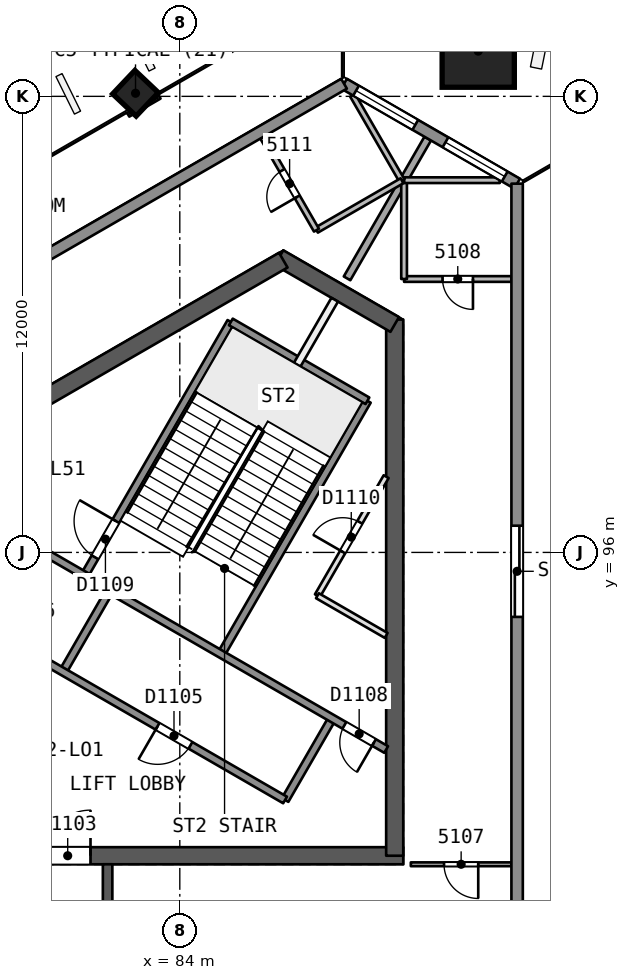
"""IFC4 building model, lengths in metres.
Left out: names, types, materials, properties, quantities, classifications, styles, units other than length and angle.
Written with IfcOpenShell. Run it as: python <this file> out.ifc"""

import sys

from ifc_helpers import new_model, si_unit, direction, frame, frame_2d, origin, origin_2d, place, context, subcontext, project, spatial, rectangle, extrude, element, fill, save


model = new_model("IFC4")
c1 = context("Model", 3, precision=1e-05, world=origin(), true_north=direction((0.0, 1.0)))
c2 = subcontext(c1, "Body", "Model", "MODEL_VIEW")
j1 = project(units=[si_unit("LENGTHUNIT", "METRE"), si_unit("PLANEANGLEUNIT", "RADIAN")], contexts=[c1])
p1 = place(None, origin())
s1 = spatial("IfcSite", under=j1, at=p1, CompositionType="ELEMENT")
p2 = place(p1, origin())
s2 = spatial("IfcBuilding", under=s1, at=p2, CompositionType="ELEMENT")
p3 = place(p2, frame((0.0, 0.0, 209.5)))
s3 = spatial("IfcBuildingStorey", under=s2, at=p3, CompositionType="ELEMENT", Elevation=209.5)
p4 = place(p3, frame((79.63, 88.019, 0.0), z_axis=(0.0, 0.0, 1.0), x_axis=(1.0, 0.0, 0.0)))
e1 = element("IfcWall", 1, at=p4, inside=s3, PredefinedType="SHEAR", context=c2, shape_type="SweptSolid", body=[
    extrude(rectangle(XDim=10.25, YDim=0.45, at=frame_2d((5.125, 0.0))), origin(), (0.0, 0.0, 1.0), 3.7),
])
p5 = place(p4, frame((0.82, 0.0, 0.0)))
e2 = element("IfcOpeningElement", 2, at=p5, cuts=e1, PredefinedType="OPENING", context=c2, shape_type="SweptSolid", body=[
    extrude(rectangle(XDim=1.2, YDim=2.1, at=frame_2d((0.6, 1.05))), frame((0.0, 0.235, 0.0), z_axis=(0.0, -1.0, 0.0), x_axis=(1.0, 0.0, 0.0)), (0.0, 0.0, 1.0), 0.471),
])
p6 = place(p3, frame((89.655, 88.019, 0.0), z_axis=(0.0, 0.0, 1.0), x_axis=(0.0, 1.0, 0.0)))
e3 = element("IfcWall", 3, at=p6, inside=s3, PredefinedType="SHEAR", context=c2, shape_type="SweptSolid", body=[
    extrude(rectangle(XDim=14.108, YDim=0.45, at=frame_2d((7.054, 0.0))), origin(), (0.0, 0.0, 1.0), 3.7),
])
p7 = place(p3, frame((89.655, 101.998, 0.0), z_axis=(0.0, 0.0, 1.0), x_axis=(-0.866042179588, 0.49997094233, 0.0)))
e4 = element("IfcWall", 4, at=p7, inside=s3, PredefinedType="SHEAR", context=c2, shape_type="SweptSolid", body=[
    extrude(rectangle(XDim=3.515, YDim=0.45, at=frame_2d((1.758, 0.0))), origin(), (0.0, 0.0, 1.0), 3.7),
])
p8 = place(p3, frame((86.723, 103.69, 0.0), z_axis=(0.0, 0.0, 1.0), x_axis=(-0.866022713978, -0.500004658852, 0.0)))
e5 = element("IfcWall", 5, at=p8, inside=s3, PredefinedType="SHEAR", context=c2, shape_type="SweptSolid", body=[
    extrude(rectangle(XDim=14.203, YDim=0.45, at=frame_2d((7.102, 0.0))), origin(), (0.0, 0.0, 1.0), 3.7),
])
p9 = place(p3, frame((82.1, 72.206, 0.0), z_axis=(0.0, 0.0, 1.0), x_axis=(0.0, 1.0, 0.0)))
e6 = element("IfcWall", 6, at=p9, inside=s3, PredefinedType="SHEAR", context=c2, shape_type="SweptSolid", body=[
    extrude(rectangle(XDim=15.588, YDim=0.25, at=frame_2d((7.794, 0.0))), origin(), (0.0, 0.0, 1.0), 3.3),
])
p10 = place(p9, frame((2.618, 0.0, 0.0)))
e7 = element("IfcOpeningElement", 7, at=p10, cuts=e6, PredefinedType="OPENING", context=c2, shape_type="SweptSolid", body=[
    extrude(rectangle(XDim=1.0, YDim=2.1, at=frame_2d((0.5, 1.05))), frame((0.0, 0.135, 0.0), z_axis=(0.0, -1.0, 0.0), x_axis=(1.0, 0.0, 0.0)), (0.0, 0.0, 1.0), 0.271),
])
p11 = place(p9, frame((8.627, 0.0, 0.0)))
e8 = element("IfcOpeningElement", 8, at=p11, cuts=e6, PredefinedType="OPENING", context=c2, shape_type="SweptSolid", body=[
    extrude(rectangle(XDim=1.1, YDim=2.1, at=frame_2d((0.55, 1.05))), frame((0.0, 0.135, 0.0), z_axis=(0.0, -1.0, 0.0), x_axis=(1.0, 0.0, 0.0)), (0.0, 0.0, 1.0), 0.271),
])
p12 = place(p9, frame((12.282, 0.0, 0.0)))
e9 = element("IfcOpeningElement", 9, at=p12, cuts=e6, PredefinedType="OPENING", context=c2, shape_type="SweptSolid", body=[
    extrude(rectangle(XDim=1.0, YDim=2.1, at=frame_2d((0.5, 1.05))), frame((0.0, 0.135, 0.0), z_axis=(0.0, -1.0, 0.0), x_axis=(1.0, 0.0, 0.0)), (0.0, 0.0, 1.0), 0.271),
])
p13 = place(p3, frame((91.874, 109.226, 0.0), z_axis=(-0.017607037296, -0.030466109479, 0.999380712447), x_axis=(0.86581098392, -0.500371202332, 2.457e-09)))
e10 = element("IfcColumn", 10, at=p13, inside=s3, PredefinedType="COLUMN", context=c2, shape_type="SweptSolid", body=[
    extrude(rectangle(XDim=1.9, YDim=1.9, at=origin_2d()), origin(), (0.0, 0.0, 1.0), 3.702),
])
p14 = place(p3, frame((82.845, 108.115, 0.0), z_axis=(-0.008376454378, -0.028163354484, 0.999568237028), x_axis=(0.86585218107, 0.499844611273, 0.021339285781)))
e11 = element("IfcColumn", 11, at=p14, inside=s3, PredefinedType="COLUMN", context=c2, shape_type="SweptSolid", body=[
    extrude(rectangle(XDim=0.85, YDim=0.85, at=origin_2d()), origin(), (0.0, 0.0, 1.0), 3.702),
])
p15 = place(p3, frame((92.727, 87.794, 0.0), z_axis=(0.0, 0.0, 1.0), x_axis=(-1.0, 0.0, 0.0)))
e12 = element("IfcWall", 12, at=p15, inside=s3, PredefinedType="PARTITIONING", context=c2, shape_type="SweptSolid", body=[
    extrude(rectangle(XDim=2.648, YDim=0.1, at=frame_2d((1.324, 0.0))), origin(), (0.0, 0.0, 1.0), 3.3),
])
p16 = place(p15, frame((0.874, 0.0, 0.0)))
e13 = element("IfcOpeningElement", 13, at=p16, cuts=e12, PredefinedType="OPENING", context=c2, shape_type="SweptSolid", body=[
    extrude(rectangle(XDim=0.9, YDim=2.1, at=frame_2d((0.45, 1.05))), frame((0.0, 0.061, 0.0), z_axis=(0.0, -1.0, 0.0), x_axis=(1.0, 0.0, 0.0)), (0.0, 0.0, 1.0), 0.121),
])
p17 = place(p3, frame((92.727, 103.194, 0.0), z_axis=(0.0, 0.0, 1.0), x_axis=(-1.0, 0.0, 0.0)))
e14 = element("IfcWall", 14, at=p17, inside=s3, PredefinedType="PARTITIONING", context=c2, shape_type="SweptSolid", body=[
    extrude(rectangle(XDim=2.825, YDim=0.15, at=frame_2d((1.413, 0.0))), origin(), (0.0, 0.0, 1.0), 3.3),
])
p18 = place(p17, frame((1.013, 0.0, 0.0)))
e15 = element("IfcOpeningElement", 15, at=p18, cuts=e14, PredefinedType="OPENING", context=c2, shape_type="SweptSolid", body=[
    extrude(rectangle(XDim=0.8, YDim=2.1, at=frame_2d((0.4, 1.05))), frame((0.0, 0.085, 0.0), z_axis=(0.0, -1.0, 0.0), x_axis=(1.0, 0.0, 0.0)), (0.0, 0.0, 1.0), 0.171),
])
p19 = place(p3, frame((89.902, 103.194, 0.0), z_axis=(0.0, 0.0, 1.0), x_axis=(0.0, 1.0, 0.0)))
e16 = element("IfcWall", 16, at=p19, inside=s3, PredefinedType="PARTITIONING", context=c2, shape_type="SweptSolid", body=[
    extrude(rectangle(XDim=2.6, YDim=0.15, at=frame_2d((1.3, 0.0))), origin(), (0.0, 0.0, 1.0), 3.3),
])
p20 = place(p3, frame((89.902, 105.794, 0.0), z_axis=(0.0, 0.0, 1.0), x_axis=(1.0, 0.0, 0.0)))
e17 = element("IfcWall", 17, at=p20, inside=s3, PredefinedType="PARTITIONING", context=c2, shape_type="SweptSolid", body=[
    extrude(rectangle(XDim=2.519, YDim=0.15, at=frame_2d((1.259, 0.0))), origin(), (0.0, 0.0, 1.0), 3.3),
])
p21 = place(p3, frame((90.524, 106.889, 0.0), z_axis=(0.0, 0.0, 1.0), x_axis=(-0.499991184371, -0.86603049343, 0.0)))
e18 = element("IfcWall", 18, at=p21, inside=s3, PredefinedType="PARTITIONING", context=c2, shape_type="SweptSolid", body=[
    extrude(rectangle(XDim=4.247, YDim=0.2, at=frame_2d((2.123, 0.0))), origin(), (0.0, 0.0, 1.0), 3.3),
])
p22 = place(p3, frame((88.548, 108.03, 0.0), z_axis=(0.0, 0.0, 1.0), x_axis=(0.500058503878, -0.86599162392, 0.0)))
e19 = element("IfcWall", 19, at=p22, inside=s3, PredefinedType="PARTITIONING", context=c2, shape_type="SweptSolid", body=[
    extrude(rectangle(XDim=2.599, YDim=0.15, at=frame_2d((1.3, 0.0))), origin(), (0.0, 0.0, 1.0), 3.3),
])
p23 = place(p3, frame((89.848, 105.779, 0.0), z_axis=(0.0, 0.0, 1.0), x_axis=(-0.866021400173, -0.500006934395, 0.0)))
e20 = element("IfcWall", 20, at=p23, inside=s3, PredefinedType="PARTITIONING", context=c2, shape_type="SweptSolid", body=[
    extrude(rectangle(XDim=2.6, YDim=0.15, at=frame_2d((1.3, 0.0))), origin(), (0.0, 0.0, 1.0), 3.3),
])
p24 = place(p3, frame((87.596, 104.479, 0.0), z_axis=(0.0, 0.0, 1.0), x_axis=(-0.500014143148, 0.86601723808, 0.0)))
e21 = element("IfcWall", 21, at=p24, inside=s3, PredefinedType="PARTITIONING", context=c2, shape_type="SweptSolid", body=[
    extrude(rectangle(XDim=2.826, YDim=0.15, at=frame_2d((1.413, 0.0))), origin(), (0.0, 0.0, 1.0), 3.3),
])
p25 = place(p24, frame((1.013, 0.0, 0.0)))
e22 = element("IfcOpeningElement", 22, at=p25, cuts=e21, PredefinedType="OPENING", context=c2, shape_type="SweptSolid", body=[
    extrude(rectangle(XDim=0.8, YDim=2.1, at=frame_2d((0.4, 1.05))), frame((0.0, 0.085, 0.0), z_axis=(0.0, -1.0, 0.0), x_axis=(1.0, 0.0, 0.0)), (0.0, 0.0, 1.0), 0.171),
])
p26 = place(p3, frame((88.322, 108.333, 0.0), z_axis=(0.0, 0.0, 1.0), x_axis=(0.866014735099, -0.50001847825, 0.0)))
e23 = element("IfcWall", 23, at=p26, inside=s3, PredefinedType="SOLIDWALL", context=c2, shape_type="SweptSolid", body=[
    extrude(rectangle(XDim=5.259, YDim=0.3, at=frame_2d((2.629, 0.0))), origin(), (0.0, 0.0, 1.0), 3.3),
])
p27 = place(p26, frame((3.082, 0.0, 0.9)))
e24 = element("IfcOpeningElement", 24, at=p27, cuts=e23, PredefinedType="OPENING", context=c2, shape_type="SweptSolid", body=[
    extrude(rectangle(XDim=1.8, YDim=1.5, at=frame_2d((0.9, 0.75))), frame((0.0, 0.161, 0.0), z_axis=(0.0, -1.0, 0.0), x_axis=(1.0, 0.0, 0.0)), (0.0, 0.0, 1.0), 0.321),
])
p28 = place(p26, frame((0.365, 0.0, 0.9)))
e25 = element("IfcOpeningElement", 25, at=p28, cuts=e23, PredefinedType="OPENING", context=c2, shape_type="SweptSolid", body=[
    extrude(rectangle(XDim=1.8, YDim=1.5, at=frame_2d((0.9, 0.75))), frame((0.0, 0.161, 0.0), z_axis=(0.0, -1.0, 0.0), x_axis=(1.0, 0.0, 0.0)), (0.0, 0.0, 1.0), 0.321),
])
p29 = place(p3, frame((92.876, 105.703, 0.0), z_axis=(0.0, 0.0, 1.0), x_axis=(0.0, -1.0, 0.0)))
e26 = element("IfcWall", 26, at=p29, inside=s3, PredefinedType="SOLIDWALL", context=c2, shape_type="SweptSolid", body=[
    extrude(rectangle(XDim=51.406, YDim=0.3, at=frame_2d((25.703, 0.0))), origin(), (0.0, 0.0, 1.0), 3.3),
])
p30 = place(p29, frame((24.191, 0.0, 0.0)))
e27 = element("IfcOpeningElement", 27, at=p30, cuts=e26, PredefinedType="OPENING", context=c2, shape_type="SweptSolid", body=[
    extrude(rectangle(XDim=2.4, YDim=2.4, at=frame_2d((1.2, 1.2))), frame((0.0, 0.161, 0.0), z_axis=(0.0, -1.0, 0.0), x_axis=(1.0, 0.0, 0.0)), (0.0, 0.0, 1.0), 0.321),
])
p31 = place(p29, frame((29.18, 0.0, 0.0)))
e28 = element("IfcOpeningElement", 28, at=p31, cuts=e26, PredefinedType="OPENING", context=c2, shape_type="SweptSolid", body=[
    extrude(rectangle(XDim=2.4, YDim=2.4, at=frame_2d((1.2, 1.2))), frame((0.0, 0.161, 0.0), z_axis=(0.0, -1.0, 0.0), x_axis=(1.0, 0.0, 0.0)), (0.0, 0.0, 1.0), 0.321),
])
p32 = place(p29, frame((39.983, 0.0, 0.0)))
e29 = element("IfcOpeningElement", 29, at=p32, cuts=e26, PredefinedType="OPENING", context=c2, shape_type="SweptSolid", body=[
    extrude(rectangle(XDim=2.4, YDim=2.4, at=frame_2d((1.2, 1.2))), frame((0.0, 0.161, 0.0), z_axis=(0.0, -1.0, 0.0), x_axis=(1.0, 0.0, 0.0)), (0.0, 0.0, 1.0), 0.321),
])
p33 = place(p29, frame((19.515, 0.0, 0.0)))
e30 = element("IfcOpeningElement", 30, at=p33, cuts=e26, PredefinedType="OPENING", context=c2, shape_type="SweptSolid", body=[
    extrude(rectangle(XDim=2.4, YDim=2.4, at=frame_2d((1.2, 1.2))), frame((0.0, 0.161, 0.0), z_axis=(0.0, -1.0, 0.0), x_axis=(1.0, 0.0, 0.0)), (0.0, 0.0, 1.0), 0.321),
])
p34 = place(p29, frame((9.0, 0.0, 0.0)))
e31 = element("IfcOpeningElement", 31, at=p34, cuts=e26, PredefinedType="OPENING", context=c2, shape_type="SweptSolid", body=[
    extrude(rectangle(XDim=2.4, YDim=2.4, at=frame_2d((1.2, 1.2))), frame((0.0, 0.161, 0.0), z_axis=(0.0, -1.0, 0.0), x_axis=(1.0, 0.0, 0.0)), (0.0, 0.0, 1.0), 0.321),
])
p35 = place(p3, frame((43.802, 82.63, 0.0), z_axis=(0.0, 0.0, 1.0), x_axis=(0.866026224187, 0.499998579018, 0.0)))
e32 = element("IfcWall", 32, at=p35, inside=s3, PredefinedType="SOLIDWALL", context=c2, shape_type="SweptSolid", body=[
    extrude(rectangle(XDim=51.406, YDim=0.3, at=frame_2d((25.703, 0.0))), origin(), (0.0, 0.0, 1.0), 3.3),
])
p36 = place(p35, frame((24.503, 0.0, 0.0)))
e33 = element("IfcOpeningElement", 33, at=p36, cuts=e32, PredefinedType="OPENING", context=c2, shape_type="SweptSolid", body=[
    extrude(rectangle(XDim=2.4, YDim=2.4, at=frame_2d((1.2, 1.2))), frame((0.0, 0.161, 0.0), z_axis=(0.0, -1.0, 0.0), x_axis=(1.0, 0.0, 0.0)), (0.0, 0.0, 1.0), 0.321),
])
p37 = place(p35, frame((30.271, 0.0, 0.0)))
e34 = element("IfcOpeningElement", 34, at=p37, cuts=e32, PredefinedType="OPENING", context=c2, shape_type="SweptSolid", body=[
    extrude(rectangle(XDim=2.4, YDim=2.4, at=frame_2d((1.2, 1.2))), frame((0.0, 0.161, 0.0), z_axis=(0.0, -1.0, 0.0), x_axis=(1.0, 0.0, 0.0)), (0.0, 0.0, 1.0), 0.321),
])
p38 = place(p35, frame((39.983, 0.0, 0.0)))
e35 = element("IfcOpeningElement", 35, at=p38, cuts=e32, PredefinedType="OPENING", context=c2, shape_type="SweptSolid", body=[
    extrude(rectangle(XDim=2.4, YDim=2.4, at=frame_2d((1.2, 1.2))), frame((0.0, 0.161, 0.0), z_axis=(0.0, -1.0, 0.0), x_axis=(1.0, 0.0, 0.0)), (0.0, 0.0, 1.0), 0.321),
])
p39 = place(p35, frame((18.736, 0.0, 0.0)))
e36 = element("IfcOpeningElement", 36, at=p39, cuts=e32, PredefinedType="OPENING", context=c2, shape_type="SweptSolid", body=[
    extrude(rectangle(XDim=2.4, YDim=2.4, at=frame_2d((1.2, 1.2))), frame((0.0, 0.161, 0.0), z_axis=(0.0, -1.0, 0.0), x_axis=(1.0, 0.0, 0.0)), (0.0, 0.0, 1.0), 0.321),
])
p40 = place(p35, frame((9.0, 0.0, 0.0)))
e37 = element("IfcOpeningElement", 37, at=p40, cuts=e32, PredefinedType="OPENING", context=c2, shape_type="SweptSolid", body=[
    extrude(rectangle(XDim=2.4, YDim=2.4, at=frame_2d((1.2, 1.2))), frame((0.0, 0.161, 0.0), z_axis=(0.0, -1.0, 0.0), x_axis=(1.0, 0.0, 0.0)), (0.0, 0.0, 1.0), 0.321),
])
p41 = place(p3, frame((86.77, 89.486, 0.0), z_axis=(0.0, 0.0, 1.0), x_axis=(0.499961042966, 0.86604789447, 0.0)))
e38 = element("IfcWall", 38, at=p41, inside=s3, PredefinedType="SOLIDWALL", context=c2, shape_type="SweptSolid", body=[
    extrude(rectangle(XDim=2.48, YDim=0.2, at=frame_2d((1.24, 0.0))), origin(), (0.0, 0.0, 1.0), 3.3),
])
p42 = place(p3, frame((87.621, 94.86, 0.0), z_axis=(0.0, 0.0, 1.0), x_axis=(0.499993116331, 0.866029378036, 0.0)))
e39 = element("IfcWall", 39, at=p42, inside=s3, PredefinedType="PARTITIONING", context=c2, shape_type="SweptSolid", body=[
    extrude(rectangle(XDim=3.618, YDim=0.15, at=frame_2d((1.809, 0.0))), origin(), (0.0, 0.0, 1.0), 3.3),
])
p43 = place(p42, frame((1.332, 0.0, 0.0)))
e40 = element("IfcOpeningElement", 40, at=p43, cuts=e39, PredefinedType="OPENING", context=c2, shape_type="SweptSolid", body=[
    extrude(rectangle(XDim=0.9, YDim=2.1, at=frame_2d((0.45, 1.05))), frame((0.0, 0.085, 0.0), z_axis=(0.0, -1.0, 0.0), x_axis=(1.0, 0.0, 0.0)), (0.0, 0.0, 1.0), 0.171),
])
p44 = place(p3, frame((85.087, 93.321, 0.0), z_axis=(0.0, 0.0, 1.0), x_axis=(0.500019787375, 0.866013979237, 0.0)))
e41 = element("IfcWall", 41, at=p44, inside=s3, PredefinedType="SOLIDWALL", context=c2, shape_type="SweptSolid", body=[
    extrude(rectangle(XDim=7.7, YDim=0.2, at=frame_2d((3.85, 0.0))), origin(), (0.0, 0.0, 1.0), 3.3),
])
p45 = place(p3, frame((87.09, 100.94, 0.0), z_axis=(0.0, 0.0, 1.0), x_axis=(0.500011643316, 0.866018681408, 0.0)))
e42 = element("IfcWall", 42, at=p45, inside=s3, PredefinedType="PARTITIONING", context=c2, shape_type="SweptSolid", body=[
    extrude(rectangle(XDim=1.973, YDim=0.2, at=frame_2d((0.987, 0.0))), origin(), (0.0, 0.0, 1.0), 3.3),
])
p46 = place(p3, frame((80.924, 92.861, 0.0), z_axis=(0.0, 0.0, 1.0), x_axis=(0.499961042966, 0.86604789447, 0.0)))
e43 = element("IfcWall", 43, at=p46, inside=s3, PredefinedType="SOLIDWALL", context=c2, shape_type="SweptSolid", body=[
    extrude(rectangle(XDim=2.48, YDim=0.2, at=frame_2d((1.24, 0.0))), origin(), (0.0, 0.0, 1.0), 3.3),
])
p47 = place(p3, frame((81.493, 95.396, 0.0), z_axis=(0.0, 0.0, 1.0), x_axis=(0.500006057782, 0.866021906294, 0.0)))
e44 = element("IfcWall", 44, at=p47, inside=s3, PredefinedType="SOLIDWALL", context=c2, shape_type="SweptSolid", body=[
    extrude(rectangle(XDim=7.7, YDim=0.2, at=frame_2d((3.85, 0.0))), origin(), (0.0, 0.0, 1.0), 3.3),
])
p48 = place(p47, frame((0.55, 0.0, 0.0)))
e45 = element("IfcOpeningElement", 45, at=p48, cuts=e44, PredefinedType="OPENING", context=c2, shape_type="SweptSolid", body=[
    extrude(rectangle(XDim=1.1, YDim=2.1, at=frame_2d((0.55, 1.05))), frame((0.0, 0.11, 0.0), z_axis=(0.0, -1.0, 0.0), x_axis=(1.0, 0.0, 0.0)), (0.0, 0.0, 1.0), 0.221),
])
p49 = place(p3, frame((86.77, 89.486, 0.0), z_axis=(0.0, 0.0, 1.0), x_axis=(-0.86601811187, 0.500012629753, 0.0)))
e46 = element("IfcWall", 46, at=p49, inside=s3, PredefinedType="SOLIDWALL", context=c2, shape_type="SweptSolid", body=[
    extrude(rectangle(XDim=10.9, YDim=0.2, at=frame_2d((5.45, 0.0))), origin(), (0.0, 0.0, 1.0), 3.3),
])
p50 = place(p49, frame((2.875, 0.0, 0.0)))
e47 = element("IfcOpeningElement", 47, at=p50, cuts=e46, PredefinedType="OPENING", context=c2, shape_type="SweptSolid", body=[
    extrude(rectangle(XDim=1.0, YDim=2.1, at=frame_2d((0.5, 1.05))), frame((0.0, 0.11, 0.0), z_axis=(0.0, -1.0, 0.0), x_axis=(1.0, 0.0, 0.0)), (0.0, 0.0, 1.0), 0.221),
])
p51 = place(p49, frame((7.375, 0.0, 0.0)))
e48 = element("IfcOpeningElement", 48, at=p51, cuts=e46, PredefinedType="OPENING", context=c2, shape_type="SweptSolid", body=[
    extrude(rectangle(XDim=1.0, YDim=2.1, at=frame_2d((0.5, 1.05))), frame((0.0, 0.11, 0.0), z_axis=(0.0, -1.0, 0.0), x_axis=(1.0, 0.0, 0.0)), (0.0, 0.0, 1.0), 0.221),
])
p52 = place(p3, frame((89.43, 90.814, 0.0), z_axis=(0.0, 0.0, 1.0), x_axis=(-0.866018983788, 0.500011119594, 0.0)))
e49 = element("IfcWall", 49, at=p52, inside=s3, PredefinedType="SOLIDWALL", context=c2, shape_type="SweptSolid", body=[
    extrude(rectangle(XDim=10.64, YDim=0.2, at=frame_2d((5.32, 0.0))), origin(), (0.0, 0.0, 1.0), 3.3),
])
p53 = place(p52, frame((0.37, 0.0, 0.0)))
e50 = element("IfcOpeningElement", 50, at=p53, cuts=e49, PredefinedType="OPENING", context=c2, shape_type="SweptSolid", body=[
    extrude(rectangle(XDim=0.9, YDim=2.1, at=frame_2d((0.45, 1.05))), frame((0.0, 0.11, 0.0), z_axis=(0.0, -1.0, 0.0), x_axis=(1.0, 0.0, 0.0)), (0.0, 0.0, 1.0), 0.221),
])
p54 = place(p3, frame((89.43, 93.816, 0.0), z_axis=(0.0, 0.0, 1.0), x_axis=(-0.866004557827, 0.500036104519, 0.0)))
e51 = element("IfcWall", 51, at=p54, inside=s3, PredefinedType="PARTITIONING", context=c2, shape_type="SweptSolid", body=[
    extrude(rectangle(XDim=2.089, YDim=0.15, at=frame_2d((1.044, 0.0))), origin(), (0.0, 0.0, 1.0), 3.3),
])
p55 = place(p3, frame((88.937, 99.99, 0.0), z_axis=(0.0, 0.0, 1.0), x_axis=(-0.866004344652, 0.500036473714, 0.0)))
e52 = element("IfcWall", 52, at=p55, inside=s3, PredefinedType="SOLIDWALL", context=c2, shape_type="SweptSolid", body=[
    extrude(rectangle(XDim=4.15, YDim=0.2, at=frame_2d((2.075, 0.0))), origin(), (0.0, 0.0, 1.0), 3.3),
])
p56 = place(p16, origin())
e53 = element("IfcDoor", 53, at=p56, inside=s3, OperationType="SINGLE_SWING_LEFT", PredefinedType="NOTDEFINED", context=c2, shape_type="SweptSolid", body=[
    extrude(rectangle(XDim=0.9, YDim=2.1, at=frame_2d((0.45, 1.05))), frame((0.0, 0.025, 0.0), z_axis=(0.0, -1.0, 0.0), x_axis=(1.0, 0.0, 0.0)), (0.0, 0.0, 1.0), 0.05),
])
fill(e13, e53)
p57 = place(p18, origin())
e54 = element("IfcDoor", 54, at=p57, inside=s3, OperationType="SINGLE_SWING_LEFT", PredefinedType="NOTDEFINED", context=c2, shape_type="SweptSolid", body=[
    extrude(rectangle(XDim=0.8, YDim=2.1, at=frame_2d((0.4, 1.05))), frame((0.0, 0.025, 0.0), z_axis=(0.0, -1.0, 0.0), x_axis=(1.0, 0.0, 0.0)), (0.0, 0.0, 1.0), 0.05),
])
fill(e15, e54)
p58 = place(p25, origin())
e55 = element("IfcDoor", 55, at=p58, inside=s3, OperationType="SINGLE_SWING_LEFT", PredefinedType="NOTDEFINED", context=c2, shape_type="SweptSolid", body=[
    extrude(rectangle(XDim=0.8, YDim=2.1, at=frame_2d((0.4, 1.05))), frame((0.0, 0.025, 0.0), z_axis=(0.0, -1.0, 0.0), x_axis=(1.0, 0.0, 0.0)), (0.0, 0.0, 1.0), 0.05),
])
fill(e22, e55)
p59 = place(p27, origin())
e56 = element("IfcWindow", 56, at=p59, inside=s3, PartitioningType="SINGLE_PANEL", PredefinedType="WINDOW", context=c2, shape_type="SweptSolid", body=[
    extrude(rectangle(XDim=1.8, YDim=1.5, at=frame_2d((0.9, 0.75))), frame((0.0, 0.03, 0.0), z_axis=(0.0, -1.0, 0.0), x_axis=(1.0, 0.0, 0.0)), (0.0, 0.0, 1.0), 0.06),
])
fill(e24, e56)
p60 = place(p28, origin())
e57 = element("IfcWindow", 57, at=p60, inside=s3, PartitioningType="SINGLE_PANEL", PredefinedType="WINDOW", context=c2, shape_type="SweptSolid", body=[
    extrude(rectangle(XDim=1.8, YDim=1.5, at=frame_2d((0.9, 0.75))), frame((0.0, 0.03, 0.0), z_axis=(0.0, -1.0, 0.0), x_axis=(1.0, 0.0, 0.0)), (0.0, 0.0, 1.0), 0.06),
])
fill(e25, e57)
p61 = place(p34, origin())
e58 = element("IfcDoor", 58, at=p61, inside=s3, OperationType="SLIDING_TO_LEFT", PredefinedType="NOTDEFINED", context=c2, shape_type="SweptSolid", body=[
    extrude(rectangle(XDim=2.4, YDim=2.4, at=frame_2d((1.2, 1.2))), frame((0.0, 0.025, 0.0), z_axis=(0.0, -1.0, 0.0), x_axis=(1.0, 0.0, 0.0)), (0.0, 0.0, 1.0), 0.05),
])
fill(e31, e58)
p62 = place(p5, origin())
e59 = element("IfcDoor", 59, at=p62, inside=s3, OperationType="SINGLE_SWING_RIGHT", PredefinedType="NOTDEFINED", context=c2, shape_type="SweptSolid", body=[
    extrude(rectangle(XDim=1.2, YDim=2.1, at=frame_2d((0.6, 1.05))), frame((0.0, 0.025, 0.0), z_axis=(0.0, -1.0, 0.0), x_axis=(1.0, 0.0, 0.0)), (0.0, 0.0, 1.0), 0.05),
])
fill(e2, e59)
p63 = place(p50, origin())
e60 = element("IfcDoor", 60, at=p63, inside=s3, OperationType="SINGLE_SWING_RIGHT", PredefinedType="NOTDEFINED", context=c2, shape_type="SweptSolid", body=[
    extrude(rectangle(XDim=1.0, YDim=2.1, at=frame_2d((0.5, 1.05))), frame((0.0, 0.025, 0.0), z_axis=(0.0, -1.0, 0.0), x_axis=(1.0, 0.0, 0.0)), (0.0, 0.0, 1.0), 0.05),
])
fill(e47, e60)
p64 = place(p53, origin())
e61 = element("IfcDoor", 61, at=p64, inside=s3, OperationType="SINGLE_SWING_LEFT", PredefinedType="NOTDEFINED", context=c2, shape_type="SweptSolid", body=[
    extrude(rectangle(XDim=0.9, YDim=2.1, at=frame_2d((0.45, 1.05))), frame((0.0, 0.025, 0.0), z_axis=(0.0, -1.0, 0.0), x_axis=(1.0, 0.0, 0.0)), (0.0, 0.0, 1.0), 0.05),
])
fill(e50, e61)
p65 = place(p48, origin())
e62 = element("IfcDoor", 62, at=p65, inside=s3, OperationType="SINGLE_SWING_RIGHT", PredefinedType="NOTDEFINED", context=c2, shape_type="SweptSolid", body=[
    extrude(rectangle(XDim=1.1, YDim=2.1, at=frame_2d((0.55, 1.05))), frame((0.0, 0.025, 0.0), z_axis=(0.0, -1.0, 0.0), x_axis=(1.0, 0.0, 0.0)), (0.0, 0.0, 1.0), 0.05),
])
fill(e45, e62)
p66 = place(p43, origin())
e63 = element("IfcDoor", 63, at=p66, inside=s3, OperationType="SINGLE_SWING_LEFT", PredefinedType="NOTDEFINED", context=c2, shape_type="SweptSolid", body=[
    extrude(rectangle(XDim=0.9, YDim=2.1, at=frame_2d((0.45, 1.05))), frame((0.0, 0.025, 0.0), z_axis=(0.0, -1.0, 0.0), x_axis=(1.0, 0.0, 0.0)), (0.0, 0.0, 1.0), 0.05),
])
fill(e40, e63)
save(model, sys.argv[1])
